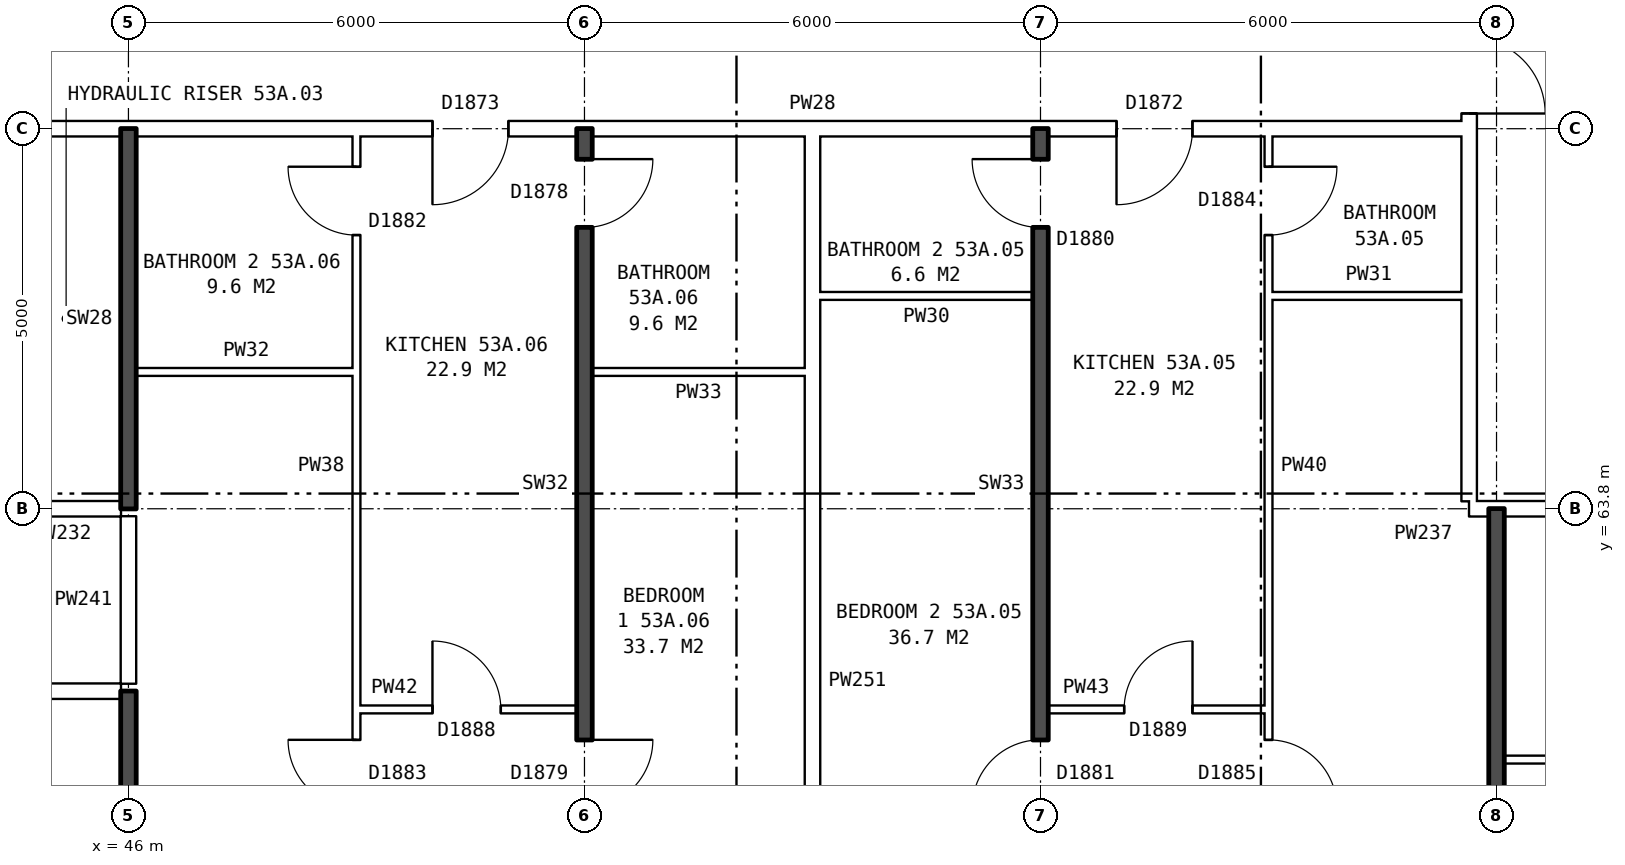
"""IFC4 building model, lengths in metres.
Left out: names, types, materials, properties, quantities, classifications, styles, units other than length and angle.
Written with IfcOpenShell. Run it as: python <this file> out.ifc"""

import sys

from ifc_helpers import new_model, si_unit, direction, frame, frame_2d, origin, place, context, subcontext, project, spatial, rectangle, extrude, element, fill, save


model = new_model("IFC4")
c1 = context("Model", 3, precision=1e-05, world=origin(), true_north=direction((0.0, 1.0)))
c2 = subcontext(c1, "Body", "Model", "MODEL_VIEW")
j1 = project(units=[si_unit("LENGTHUNIT", "METRE"), si_unit("PLANEANGLEUNIT", "RADIAN")], contexts=[c1])
p1 = place(None, origin())
s1 = spatial("IfcSite", under=j1, at=p1, CompositionType="ELEMENT")
p2 = place(p1, origin())
s2 = spatial("IfcBuilding", under=s1, at=p2, CompositionType="ELEMENT")
p3 = place(p2, frame((0.0, 0.0, 188.2)))
s3 = spatial("IfcBuildingStorey", under=s2, at=p3, CompositionType="ELEMENT", Elevation=188.2)
p4 = place(p3, frame((63.64, 63.9, 0.0), z_axis=(0.0, 0.0, 1.0), x_axis=(0.0, 1.0, 0.0)))
e1 = element("IfcWall", 1, at=p4, inside=s3, PredefinedType="PARTITIONING", context=c2, shape_type="SweptSolid", body=[
    extrude(rectangle(XDim=12.2, YDim=0.2, at=frame_2d((6.1, 0.0))), origin(), (0.0, 0.0, 1.0), 2.85),
])
p5 = place(p4, frame((5.1, 0.0, 0.0)))
e2 = element("IfcOpeningElement", 2, at=p5, cuts=e1, PredefinedType="OPENING", context=c2, shape_type="SweptSolid", body=[
    extrude(rectangle(XDim=2.0, YDim=2.1, at=frame_2d((1.0, 1.05))), frame((0.0, 0.11, 0.0), z_axis=(0.0, -1.0, 0.0), x_axis=(1.0, 0.0, 0.0)), (0.0, 0.0, 1.0), 0.22),
])
p6 = place(p3, frame((64.1, 60.5, 0.0), z_axis=(0.0, 0.0, 1.0), x_axis=(1.0, 0.0, 0.0)))
e3 = element("IfcWall", 3, at=p6, inside=s3, PredefinedType="PARTITIONING", context=c2, shape_type="SweptSolid", body=[
    extrude(rectangle(XDim=5.8, YDim=0.1, at=frame_2d((2.9, 0.0))), origin(), (0.0, 0.0, 1.0), 2.85),
])
p7 = place(p6, frame((3.6, 0.0, 0.0)))
e4 = element("IfcOpeningElement", 4, at=p7, cuts=e3, PredefinedType="OPENING", context=c2, shape_type="SweptSolid", body=[
    extrude(rectangle(XDim=0.9, YDim=2.1, at=frame_2d((0.45, 1.05))), frame((0.0, 0.06, 0.0), z_axis=(0.0, -1.0, 0.0), x_axis=(1.0, 0.0, 0.0)), (0.0, 0.0, 1.0), 0.12),
])
p8 = place(p6, frame((0.7, 0.0, 0.0)))
e5 = element("IfcOpeningElement", 5, at=p8, cuts=e3, PredefinedType="OPENING", context=c2, shape_type="SweptSolid", body=[
    extrude(rectangle(XDim=0.9, YDim=2.1, at=frame_2d((0.45, 1.05))), frame((0.0, 0.06, 0.0), z_axis=(0.0, -1.0, 0.0), x_axis=(1.0, 0.0, 0.0)), (0.0, 0.0, 1.0), 0.12),
])
p9 = place(p3, frame((49.0, 61.16, 0.0), z_axis=(0.0, 0.0, 1.0), x_axis=(1.0, 0.0, 0.0)))
e6 = element("IfcWall", 6, at=p9, inside=s3, PredefinedType="PARTITIONING", context=c2, shape_type="SweptSolid", body=[
    extrude(rectangle(XDim=2.9, YDim=0.1, at=frame_2d((1.45, 0.0))), origin(), (0.0, 0.0, 1.0), 2.85),
])
p10 = place(p9, frame((1.0, 0.0, 0.0)))
e7 = element("IfcOpeningElement", 7, at=p10, cuts=e6, PredefinedType="OPENING", context=c2, shape_type="SweptSolid", body=[
    extrude(rectangle(XDim=0.9, YDim=2.1, at=frame_2d((0.45, 1.05))), frame((0.0, 0.06, 0.0), z_axis=(0.0, -1.0, 0.0), x_axis=(1.0, 0.0, 0.0)), (0.0, 0.0, 1.0), 0.12),
])
p11 = place(p3, frame((58.1, 61.16, 0.0), z_axis=(0.0, 0.0, 1.0), x_axis=(1.0, 0.0, 0.0)))
e8 = element("IfcWall", 8, at=p11, inside=s3, PredefinedType="PARTITIONING", context=c2, shape_type="SweptSolid", body=[
    extrude(rectangle(XDim=2.9, YDim=0.1, at=frame_2d((1.45, 0.0))), origin(), (0.0, 0.0, 1.0), 2.85),
])
p12 = place(p11, frame((1.0, 0.0, 0.0)))
e9 = element("IfcOpeningElement", 9, at=p12, cuts=e8, PredefinedType="OPENING", context=c2, shape_type="SweptSolid", body=[
    extrude(rectangle(XDim=0.9, YDim=2.1, at=frame_2d((0.45, 1.05))), frame((0.0, 0.06, 0.0), z_axis=(0.0, -1.0, 0.0), x_axis=(1.0, 0.0, 0.0)), (0.0, 0.0, 1.0), 0.12),
])
p13 = place(p3, frame((30.61, 61.4, 0.0), z_axis=(0.0, 0.0, 1.0), x_axis=(1.0, 0.0, 0.0)))
e10 = element("IfcWall", 10, at=p13, inside=s3, PredefinedType="PARTITIONING", context=c2, shape_type="SweptSolid", body=[
    extrude(rectangle(XDim=15.29, YDim=0.2, at=frame_2d((7.645, 0.0))), origin(), (0.0, 0.0, 1.0), 2.85),
])
p14 = place(p13, frame((10.69, 0.0, 0.0)))
e11 = element("IfcOpeningElement", 11, at=p14, cuts=e10, PredefinedType="OPENING", context=c2, shape_type="SweptSolid", body=[
    extrude(rectangle(XDim=1.0, YDim=2.1, at=frame_2d((0.5, 1.05))), frame((0.0, 0.11, 0.0), z_axis=(0.0, -1.0, 0.0), x_axis=(1.0, 0.0, 0.0)), (0.0, 0.0, 1.0), 0.22),
])
p15 = place(p13, frame((5.89, 0.0, 0.0)))
e12 = element("IfcOpeningElement", 12, at=p15, cuts=e10, PredefinedType="OPENING", context=c2, shape_type="SweptSolid", body=[
    extrude(rectangle(XDim=1.0, YDim=2.1, at=frame_2d((0.5, 1.05))), frame((0.0, 0.11, 0.0), z_axis=(0.0, -1.0, 0.0), x_axis=(1.0, 0.0, 0.0)), (0.0, 0.0, 1.0), 0.22),
])
p16 = place(p3, frame((44.36, 63.8, 0.0), z_axis=(0.0, 0.0, 1.0), x_axis=(1.0, 0.0, 0.0)))
e13 = element("IfcWall", 13, at=p16, inside=s3, PredefinedType="PARTITIONING", context=c2, shape_type="SweptSolid", body=[
    extrude(rectangle(XDim=1.54, YDim=0.2, at=frame_2d((0.77, 0.0))), origin(), (0.0, 0.0, 1.0), 2.85),
])
p17 = place(p3, frame((63.64, 63.8, 0.0), z_axis=(0.0, 0.0, 1.0), x_axis=(1.0, 0.0, 0.0)))
e14 = element("IfcWall", 14, at=p17, inside=s3, PredefinedType="PARTITIONING", context=c2, shape_type="SweptSolid", body=[
    extrude(rectangle(XDim=3.0, YDim=0.2, at=frame_2d((1.5, 0.0))), origin(), (0.0, 0.0, 1.0), 2.85),
])
p18 = place(p17, frame((1.18, 0.0, 0.0)))
e15 = element("IfcOpeningElement", 15, at=p18, cuts=e14, PredefinedType="OPENING", context=c2, shape_type="SweptSolid", body=[
    extrude(rectangle(XDim=1.0, YDim=2.1, at=frame_2d((0.5, 1.05))), frame((0.0, 0.11, 0.0), z_axis=(0.0, -1.0, 0.0), x_axis=(1.0, 0.0, 0.0)), (0.0, 0.0, 1.0), 0.22),
])
p19 = place(p3, frame((46.1, 65.6, 0.0), z_axis=(0.0, 0.0, 1.0), x_axis=(1.0, 0.0, 0.0)))
e16 = element("IfcWall", 16, at=p19, inside=s3, PredefinedType="PARTITIONING", context=c2, shape_type="SweptSolid", body=[
    extrude(rectangle(XDim=2.9, YDim=0.1, at=frame_2d((1.45, 0.0))), origin(), (0.0, 0.0, 1.0), 2.85),
])
for number, where, z_axis, x_axis in (
    (17, (52.1, 65.6, 0.0), (0.0, 0.0, 1.0), (1.0, 0.0, 0.0)),
    (18, (55.1, 66.6, 0.0), (0.0, 0.0, 1.0), (1.0, 0.0, 0.0)),
):
    element("IfcWall", number, at=place(p3, frame(where, z_axis=z_axis, x_axis=x_axis)), inside=s3, PredefinedType="PARTITIONING", context=c2, shape_type="SweptSolid", body=[
        extrude(rectangle(XDim=2.8, YDim=0.1, at=frame_2d((1.4, 0.0))), origin(), (0.0, 0.0, 1.0), 2.85),
    ])
p20 = place(p3, frame((61.0, 66.6, 0.0), z_axis=(0.0, 0.0, 1.0), x_axis=(1.0, 0.0, 0.0)))
e19 = element("IfcWall", 19, at=p20, inside=s3, PredefinedType="PARTITIONING", context=c2, shape_type="SweptSolid", body=[
    extrude(rectangle(XDim=2.64, YDim=0.1, at=frame_2d((1.32, 0.0))), origin(), (0.0, 0.0, 1.0), 2.85),
])
p21 = place(p3, frame((44.36, 68.8, 0.0), z_axis=(0.0, 0.0, 1.0), x_axis=(1.0, 0.0, 0.0)))
e20 = element("IfcWall", 20, at=p21, inside=s3, PredefinedType="PARTITIONING", context=c2, shape_type="SweptSolid", body=[
    extrude(rectangle(XDim=19.28, YDim=0.2, at=frame_2d((9.64, 0.0))), origin(), (0.0, 0.0, 1.0), 2.85),
])
p22 = place(p21, frame((14.64, 0.0, 0.0)))
e21 = element("IfcOpeningElement", 21, at=p22, cuts=e20, PredefinedType="OPENING", context=c2, shape_type="SweptSolid", body=[
    extrude(rectangle(XDim=1.0, YDim=2.1, at=frame_2d((0.5, 1.05))), frame((0.0, 0.11, 0.0), z_axis=(0.0, -1.0, 0.0), x_axis=(1.0, 0.0, 0.0)), (0.0, 0.0, 1.0), 0.22),
])
p23 = place(p21, frame((5.64, 0.0, 0.0)))
e22 = element("IfcOpeningElement", 22, at=p23, cuts=e20, PredefinedType="OPENING", context=c2, shape_type="SweptSolid", body=[
    extrude(rectangle(XDim=1.0, YDim=2.1, at=frame_2d((0.5, 1.05))), frame((0.0, 0.11, 0.0), z_axis=(0.0, -1.0, 0.0), x_axis=(1.0, 0.0, 0.0)), (0.0, 0.0, 1.0), 0.22),
])
p24 = place(p3, frame((46.0, 54.36, 0.0), z_axis=(0.0, 0.0, 1.0), x_axis=(0.0, 1.0, 0.0)))
e23 = element("IfcWall", 23, at=p24, inside=s3, PredefinedType="SOLIDWALL", context=c2, shape_type="SweptSolid", body=[
    extrude(rectangle(XDim=7.04, YDim=0.2, at=frame_2d((3.52, 0.0))), origin(), (0.0, 0.0, 1.0), 2.85),
])
p25 = place(p3, frame((46.0, 61.5, 0.0), z_axis=(0.0, 0.0, 1.0), x_axis=(0.0, 1.0, 0.0)))
e24 = element("IfcWall", 24, at=p25, inside=s3, PredefinedType="PARTITIONING", context=c2, shape_type="SweptSolid", body=[
    extrude(rectangle(XDim=2.2, YDim=0.2, at=frame_2d((1.1, 0.0))), origin(), (0.0, 0.0, 1.0), 2.85),
])
p26 = place(p3, frame((46.0, 63.8, 0.0), z_axis=(0.0, 0.0, 1.0), x_axis=(0.0, 1.0, 0.0)))
e25 = element("IfcWall", 25, at=p26, inside=s3, PredefinedType="SOLIDWALL", context=c2, shape_type="SweptSolid", body=[
    extrude(rectangle(XDim=5.0, YDim=0.2, at=frame_2d((2.5, 0.0))), origin(), (0.0, 0.0, 1.0), 2.85),
])
p27 = place(p3, frame((49.0, 54.36, 0.0), z_axis=(0.0, 0.0, 1.0), x_axis=(0.0, 1.0, 0.0)))
e26 = element("IfcWall", 26, at=p27, inside=s3, PredefinedType="PARTITIONING", context=c2, shape_type="SweptSolid", body=[
    extrude(rectangle(XDim=14.34, YDim=0.1, at=frame_2d((7.17, 0.0))), origin(), (0.0, 0.0, 1.0), 2.85),
])
p28 = place(p27, frame((5.5, 0.0, 0.0)))
e27 = element("IfcOpeningElement", 27, at=p28, cuts=e26, PredefinedType="OPENING", context=c2, shape_type="SweptSolid", body=[
    extrude(rectangle(XDim=0.9, YDim=2.1, at=frame_2d((0.45, 1.05))), frame((0.0, 0.06, 0.0), z_axis=(0.0, -1.0, 0.0), x_axis=(1.0, 0.0, 0.0)), (0.0, 0.0, 1.0), 0.12),
])
p29 = place(p27, frame((13.04, 0.0, 0.0)))
e28 = element("IfcOpeningElement", 28, at=p29, cuts=e26, PredefinedType="OPENING", context=c2, shape_type="SweptSolid", body=[
    extrude(rectangle(XDim=0.9, YDim=2.1, at=frame_2d((0.45, 1.05))), frame((0.0, 0.06, 0.0), z_axis=(0.0, -1.0, 0.0), x_axis=(1.0, 0.0, 0.0)), (0.0, 0.0, 1.0), 0.12),
])
p30 = place(p3, frame((52.0, 54.36, 0.0), z_axis=(0.0, 0.0, 1.0), x_axis=(0.0, 1.0, 0.0)))
e29 = element("IfcWall", 29, at=p30, inside=s3, PredefinedType="SOLIDWALL", context=c2, shape_type="SweptSolid", body=[
    extrude(rectangle(XDim=14.44, YDim=0.2, at=frame_2d((7.22, 0.0))), origin(), (0.0, 0.0, 1.0), 2.85),
])
p31 = place(p30, frame((5.5, 0.0, 0.0)))
e30 = element("IfcOpeningElement", 30, at=p31, cuts=e29, PredefinedType="OPENING", context=c2, shape_type="SweptSolid", body=[
    extrude(rectangle(XDim=0.9, YDim=2.1, at=frame_2d((0.45, 1.05))), frame((0.0, 0.11, 0.0), z_axis=(0.0, -1.0, 0.0), x_axis=(1.0, 0.0, 0.0)), (0.0, 0.0, 1.0), 0.22),
])
p32 = place(p30, frame((13.14, 0.0, 0.0)))
e31 = element("IfcOpeningElement", 31, at=p32, cuts=e29, PredefinedType="OPENING", context=c2, shape_type="SweptSolid", body=[
    extrude(rectangle(XDim=0.9, YDim=2.1, at=frame_2d((0.45, 1.05))), frame((0.0, 0.11, 0.0), z_axis=(0.0, -1.0, 0.0), x_axis=(1.0, 0.0, 0.0)), (0.0, 0.0, 1.0), 0.22),
])
p33 = place(p3, frame((55.0, 54.36, 0.0), z_axis=(0.0, 0.0, 1.0), x_axis=(0.0, 1.0, 0.0)))
e32 = element("IfcWall", 32, at=p33, inside=s3, PredefinedType="PARTITIONING", context=c2, shape_type="SweptSolid", body=[
    extrude(rectangle(XDim=14.34, YDim=0.2, at=frame_2d((7.17, 0.0))), origin(), (0.0, 0.0, 1.0), 2.85),
])
p34 = place(p3, frame((58.0, 54.36, 0.0), z_axis=(0.0, 0.0, 1.0), x_axis=(0.0, 1.0, 0.0)))
e33 = element("IfcWall", 33, at=p34, inside=s3, PredefinedType="SOLIDWALL", context=c2, shape_type="SweptSolid", body=[
    extrude(rectangle(XDim=14.44, YDim=0.2, at=frame_2d((7.22, 0.0))), origin(), (0.0, 0.0, 1.0), 2.85),
])
p35 = place(p34, frame((5.5, 0.0, 0.0)))
e34 = element("IfcOpeningElement", 34, at=p35, cuts=e33, PredefinedType="OPENING", context=c2, shape_type="SweptSolid", body=[
    extrude(rectangle(XDim=0.9, YDim=2.1, at=frame_2d((0.45, 1.05))), frame((0.0, 0.11, 0.0), z_axis=(0.0, -1.0, 0.0), x_axis=(1.0, 0.0, 0.0)), (0.0, 0.0, 1.0), 0.22),
])
p36 = place(p34, frame((13.14, 0.0, 0.0)))
e35 = element("IfcOpeningElement", 35, at=p36, cuts=e33, PredefinedType="OPENING", context=c2, shape_type="SweptSolid", body=[
    extrude(rectangle(XDim=0.9, YDim=2.1, at=frame_2d((0.45, 1.05))), frame((0.0, 0.11, 0.0), z_axis=(0.0, -1.0, 0.0), x_axis=(1.0, 0.0, 0.0)), (0.0, 0.0, 1.0), 0.22),
])
p37 = place(p3, frame((61.0, 54.36, 0.0), z_axis=(0.0, 0.0, 1.0), x_axis=(0.0, 1.0, 0.0)))
e36 = element("IfcWall", 36, at=p37, inside=s3, PredefinedType="PARTITIONING", context=c2, shape_type="SweptSolid", body=[
    extrude(rectangle(XDim=14.34, YDim=0.1, at=frame_2d((7.17, 0.0))), origin(), (0.0, 0.0, 1.0), 2.85),
])
p38 = place(p37, frame((5.5, 0.0, 0.0)))
e37 = element("IfcOpeningElement", 37, at=p38, cuts=e36, PredefinedType="OPENING", context=c2, shape_type="SweptSolid", body=[
    extrude(rectangle(XDim=0.9, YDim=2.1, at=frame_2d((0.45, 1.05))), frame((0.0, 0.06, 0.0), z_axis=(0.0, -1.0, 0.0), x_axis=(1.0, 0.0, 0.0)), (0.0, 0.0, 1.0), 0.12),
])
p39 = place(p37, frame((13.04, 0.0, 0.0)))
e38 = element("IfcOpeningElement", 38, at=p39, cuts=e36, PredefinedType="OPENING", context=c2, shape_type="SweptSolid", body=[
    extrude(rectangle(XDim=0.9, YDim=2.1, at=frame_2d((0.45, 1.05))), frame((0.0, 0.06, 0.0), z_axis=(0.0, -1.0, 0.0), x_axis=(1.0, 0.0, 0.0)), (0.0, 0.0, 1.0), 0.12),
])
p40 = place(p3, frame((64.0, 54.36, 0.0), z_axis=(0.0, 0.0, 1.0), x_axis=(0.0, 1.0, 0.0)))
e39 = element("IfcWall", 39, at=p40, inside=s3, PredefinedType="SOLIDWALL", context=c2, shape_type="SweptSolid", body=[
    extrude(rectangle(XDim=9.44, YDim=0.2, at=frame_2d((4.72, 0.0))), origin(), (0.0, 0.0, 1.0), 2.85),
])
p41 = place(p5, frame((2.0, 0.0, 0.0), z_axis=(0.0, 0.0, 1.0), x_axis=(-1.0, 0.0, 0.0)))
e40 = element("IfcDoor", 40, at=p41, inside=s3, OperationType="DOUBLE_DOOR_SINGLE_SWING", PredefinedType="DOOR", context=c2, shape_type="SweptSolid", body=[
    extrude(rectangle(XDim=2.0, YDim=2.1, at=frame_2d((1.0, 1.05))), frame((0.0, 0.025, 0.0), z_axis=(0.0, -1.0, 0.0), x_axis=(1.0, 0.0, 0.0)), (0.0, 0.0, 1.0), 0.05),
])
fill(e2, e40)
p42 = place(p38, frame((0.9, 0.0, 0.0), z_axis=(0.0, 0.0, 1.0), x_axis=(-1.0, 0.0, 0.0)))
e41 = element("IfcDoor", 41, at=p42, inside=s3, OperationType="SINGLE_SWING_RIGHT", PredefinedType="DOOR", context=c2, shape_type="SweptSolid", body=[
    extrude(rectangle(XDim=0.9, YDim=2.1, at=frame_2d((0.45, 1.05))), frame((0.0, 0.025, 0.0), z_axis=(0.0, -1.0, 0.0), x_axis=(1.0, 0.0, 0.0)), (0.0, 0.0, 1.0), 0.05),
])
fill(e37, e41)
p43 = place(p35, origin())
e42 = element("IfcDoor", 42, at=p43, inside=s3, OperationType="SINGLE_SWING_LEFT", PredefinedType="DOOR", context=c2, shape_type="SweptSolid", body=[
    extrude(rectangle(XDim=0.9, YDim=2.1, at=frame_2d((0.45, 1.05))), frame((0.0, 0.025, 0.0), z_axis=(0.0, -1.0, 0.0), x_axis=(1.0, 0.0, 0.0)), (0.0, 0.0, 1.0), 0.05),
])
fill(e34, e42)
p44 = place(p22, frame((1.0, 0.0, 0.0), z_axis=(0.0, 0.0, 1.0), x_axis=(-1.0, 0.0, 0.0)))
e43 = element("IfcDoor", 43, at=p44, inside=s3, OperationType="SINGLE_SWING_RIGHT", PredefinedType="DOOR", context=c2, shape_type="SweptSolid", body=[
    extrude(rectangle(XDim=1.0, YDim=2.1, at=frame_2d((0.5, 1.05))), frame((0.0, 0.025, 0.0), z_axis=(0.0, -1.0, 0.0), x_axis=(1.0, 0.0, 0.0)), (0.0, 0.0, 1.0), 0.05),
])
fill(e21, e43)
p45 = place(p12, origin())
e44 = element("IfcDoor", 44, at=p45, inside=s3, OperationType="SINGLE_SWING_RIGHT", PredefinedType="DOOR", context=c2, shape_type="SweptSolid", body=[
    extrude(rectangle(XDim=0.9, YDim=2.1, at=frame_2d((0.45, 1.05))), frame((0.0, 0.025, 0.0), z_axis=(0.0, -1.0, 0.0), x_axis=(1.0, 0.0, 0.0)), (0.0, 0.0, 1.0), 0.05),
])
fill(e9, e44)
p46 = place(p39, frame((0.9, 0.0, 0.0), z_axis=(0.0, 0.0, 1.0), x_axis=(-1.0, 0.0, 0.0)))
e45 = element("IfcDoor", 45, at=p46, inside=s3, OperationType="SINGLE_SWING_LEFT", PredefinedType="DOOR", context=c2, shape_type="SweptSolid", body=[
    extrude(rectangle(XDim=0.9, YDim=2.1, at=frame_2d((0.45, 1.05))), frame((0.0, 0.025, 0.0), z_axis=(0.0, -1.0, 0.0), x_axis=(1.0, 0.0, 0.0)), (0.0, 0.0, 1.0), 0.05),
])
fill(e38, e45)
p47 = place(p36, origin())
e46 = element("IfcDoor", 46, at=p47, inside=s3, OperationType="SINGLE_SWING_RIGHT", PredefinedType="DOOR", context=c2, shape_type="SweptSolid", body=[
    extrude(rectangle(XDim=0.9, YDim=2.1, at=frame_2d((0.45, 1.05))), frame((0.0, 0.025, 0.0), z_axis=(0.0, -1.0, 0.0), x_axis=(1.0, 0.0, 0.0)), (0.0, 0.0, 1.0), 0.05),
])
fill(e35, e46)
p48 = place(p31, frame((0.9, 0.0, 0.0), z_axis=(0.0, 0.0, 1.0), x_axis=(-1.0, 0.0, 0.0)))
e47 = element("IfcDoor", 47, at=p48, inside=s3, OperationType="SINGLE_SWING_LEFT", PredefinedType="DOOR", context=c2, shape_type="SweptSolid", body=[
    extrude(rectangle(XDim=0.9, YDim=2.1, at=frame_2d((0.45, 1.05))), frame((0.0, 0.025, 0.0), z_axis=(0.0, -1.0, 0.0), x_axis=(1.0, 0.0, 0.0)), (0.0, 0.0, 1.0), 0.05),
])
fill(e30, e47)
p49 = place(p28, origin())
e48 = element("IfcDoor", 48, at=p49, inside=s3, OperationType="SINGLE_SWING_RIGHT", PredefinedType="DOOR", context=c2, shape_type="SweptSolid", body=[
    extrude(rectangle(XDim=0.9, YDim=2.1, at=frame_2d((0.45, 1.05))), frame((0.0, 0.025, 0.0), z_axis=(0.0, -1.0, 0.0), x_axis=(1.0, 0.0, 0.0)), (0.0, 0.0, 1.0), 0.05),
])
fill(e27, e48)
p50 = place(p23, frame((1.0, 0.0, 0.0), z_axis=(0.0, 0.0, 1.0), x_axis=(-1.0, 0.0, 0.0)))
e49 = element("IfcDoor", 49, at=p50, inside=s3, OperationType="SINGLE_SWING_RIGHT", PredefinedType="DOOR", context=c2, shape_type="SweptSolid", body=[
    extrude(rectangle(XDim=1.0, YDim=2.1, at=frame_2d((0.5, 1.05))), frame((0.0, 0.025, 0.0), z_axis=(0.0, -1.0, 0.0), x_axis=(1.0, 0.0, 0.0)), (0.0, 0.0, 1.0), 0.05),
])
fill(e22, e49)
p51 = place(p10, origin())
e50 = element("IfcDoor", 50, at=p51, inside=s3, OperationType="SINGLE_SWING_LEFT", PredefinedType="DOOR", context=c2, shape_type="SweptSolid", body=[
    extrude(rectangle(XDim=0.9, YDim=2.1, at=frame_2d((0.45, 1.05))), frame((0.0, 0.025, 0.0), z_axis=(0.0, -1.0, 0.0), x_axis=(1.0, 0.0, 0.0)), (0.0, 0.0, 1.0), 0.05),
])
fill(e7, e50)
p52 = place(p32, frame((0.9, 0.0, 0.0), z_axis=(0.0, 0.0, 1.0), x_axis=(-1.0, 0.0, 0.0)))
e51 = element("IfcDoor", 51, at=p52, inside=s3, OperationType="SINGLE_SWING_LEFT", PredefinedType="DOOR", context=c2, shape_type="SweptSolid", body=[
    extrude(rectangle(XDim=0.9, YDim=2.1, at=frame_2d((0.45, 1.05))), frame((0.0, 0.025, 0.0), z_axis=(0.0, -1.0, 0.0), x_axis=(1.0, 0.0, 0.0)), (0.0, 0.0, 1.0), 0.05),
])
fill(e31, e51)
p53 = place(p29, origin())
e52 = element("IfcDoor", 52, at=p53, inside=s3, OperationType="SINGLE_SWING_RIGHT", PredefinedType="DOOR", context=c2, shape_type="SweptSolid", body=[
    extrude(rectangle(XDim=0.9, YDim=2.1, at=frame_2d((0.45, 1.05))), frame((0.0, 0.025, 0.0), z_axis=(0.0, -1.0, 0.0), x_axis=(1.0, 0.0, 0.0)), (0.0, 0.0, 1.0), 0.05),
])
fill(e28, e52)
save(model, sys.argv[1])
